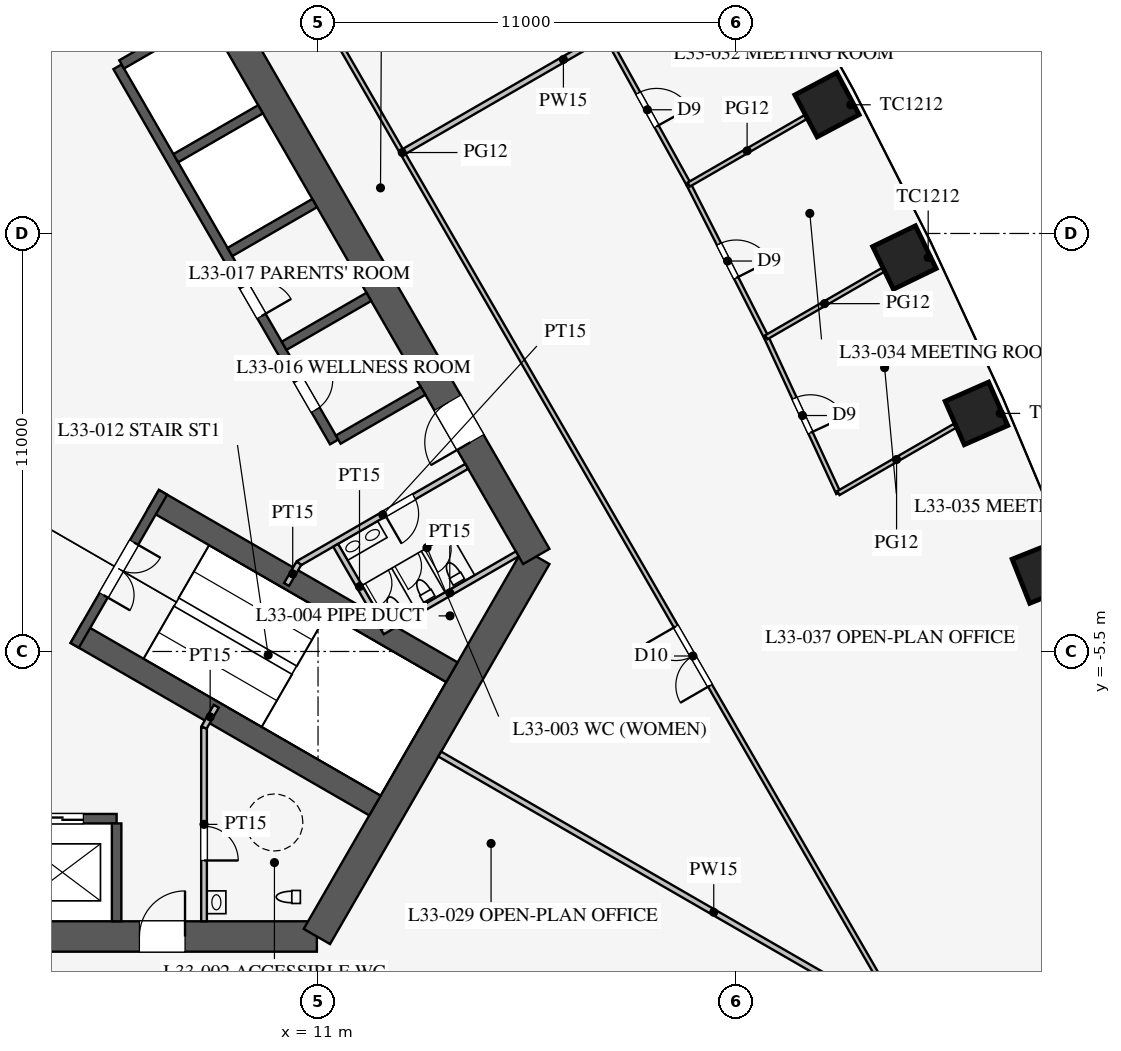
"""IFC4 building model, lengths in metres.
Left out: names, types, materials, properties, quantities, classifications, styles, units other than length and angle.
Written with IfcOpenShell. Run it as: python <this file> out.ifc"""

import sys

from ifc_helpers import new_model, si_unit, direction, frame, frame_2d, origin, origin_2d, place, context, subcontext, project, spatial, rectangle, extrude, element, fill, save


model = new_model("IFC4")
c1 = context("Model", 3, precision=1e-05, world=origin(), true_north=direction((0.0, 1.0)))
c2 = subcontext(c1, "Body", "Model", "MODEL_VIEW")
j1 = project(units=[si_unit("LENGTHUNIT", "METRE"), si_unit("PLANEANGLEUNIT", "RADIAN")], contexts=[c1])
p1 = place(None, origin())
s1 = spatial("IfcSite", under=j1, at=p1, CompositionType="ELEMENT")
p2 = place(p1, origin())
s2 = spatial("IfcBuilding", under=s1, at=p2, CompositionType="ELEMENT")
p3 = place(p2, frame((0.0, 0.0, 145.1)))
s3 = spatial("IfcBuildingStorey", under=s2, at=p3, CompositionType="ELEMENT", Elevation=145.1)
for number, where, z_axis, x_axis in (
    (1, (30.077, -3.42, 0.0), (0.0, 0.0, 1.0), (-0.37, 0.929, 0.0)),
    (2, (28.325, 0.765, 0.0), (0.0, 0.0, 1.0), (-0.403, 0.915, 0.0)),
    (3, (26.43, 4.867, 0.0), (0.0, 0.0, 1.0), (-0.436, 0.9, 0.0)),
    (4, (24.393, 8.887, 0.0), (0.0, 0.0, 1.0), (-0.468, 0.883, 0.0)),
):
    element("IfcColumn", number, at=place(p3, frame(where, z_axis=z_axis, x_axis=x_axis)), inside=s3, PredefinedType="COLUMN", context=c2, shape_type="SweptSolid", body=[
        extrude(rectangle(XDim=1.25, YDim=1.25, at=origin_2d()), origin(), (0.0, 0.0, 1.0), 4.2),
    ])
p4 = place(p3, frame((-10.97, -13.0, 0.0), z_axis=(0.0, 0.0, 1.0), x_axis=(1.0, 0.0, 0.0)))
e5 = element("IfcWall", 5, at=p4, inside=s3, PredefinedType="SHEAR", context=c2, shape_type="SweptSolid", body=[
    extrude(rectangle(XDim=21.939, YDim=0.8, at=frame_2d((10.97, 0.0))), origin(), (0.0, 0.0, 1.0), 4.2),
])
p5 = place(p4, frame((17.27, 0.0, 0.0)))
e6 = element("IfcOpeningElement", 6, at=p5, cuts=e5, PredefinedType="OPENING", context=c2, shape_type="SweptSolid", body=[
    extrude(rectangle(XDim=1.2, YDim=2.1, at=frame_2d((0.6, 1.05))), frame((0.0, 0.41, 0.0), z_axis=(0.0, -1.0, 0.0), x_axis=(1.0, 0.0, 0.0)), (0.0, 0.0, 1.0), 0.82),
])
p6 = place(p4, frame((3.47, 0.0, 0.0)))
e7 = element("IfcOpeningElement", 7, at=p6, cuts=e5, PredefinedType="OPENING", context=c2, shape_type="SweptSolid", body=[
    extrude(rectangle(XDim=1.2, YDim=2.1, at=frame_2d((0.6, 1.05))), frame((0.0, 0.41, 0.0), z_axis=(0.0, -1.0, 0.0), x_axis=(1.0, 0.0, 0.0)), (0.0, 0.0, 1.0), 0.82),
])
p7 = place(p3, frame((10.97, -13.0, 0.0), z_axis=(0.0, 0.0, 1.0), x_axis=(0.499995765644, 0.866027848477, 0.0)))
e8 = element("IfcWall", 8, at=p7, inside=s3, PredefinedType="SHEAR", context=c2, shape_type="SweptSolid", body=[
    extrude(rectangle(XDim=11.547, YDim=0.8, at=frame_2d((5.773, 0.0))), origin(), (0.0, 0.0, 1.0), 4.2),
])
p8 = place(p3, frame((16.743, -3.0, 0.0), z_axis=(0.0, 0.0, 1.0), x_axis=(-0.500002442456, 0.866023993627, 0.0)))
e9 = element("IfcWall", 9, at=p8, inside=s3, PredefinedType="SHEAR", context=c2, shape_type="SweptSolid", body=[
    extrude(rectangle(XDim=21.939, YDim=0.8, at=frame_2d((10.97, 0.0))), origin(), (0.0, 0.0, 1.0), 4.2),
])
p9 = place(p8, frame((17.27, 0.0, 0.0)))
e10 = element("IfcOpeningElement", 10, at=p9, cuts=e9, PredefinedType="OPENING", context=c2, shape_type="SweptSolid", body=[
    extrude(rectangle(XDim=1.2, YDim=2.1, at=frame_2d((0.6, 1.05))), frame((0.0, 0.41, 0.0), z_axis=(0.0, -1.0, 0.0), x_axis=(1.0, 0.0, 0.0)), (0.0, 0.0, 1.0), 0.82),
])
p10 = place(p8, frame((3.47, 0.0, 0.0)))
e11 = element("IfcOpeningElement", 11, at=p10, cuts=e9, PredefinedType="OPENING", context=c2, shape_type="SweptSolid", body=[
    extrude(rectangle(XDim=1.2, YDim=2.1, at=frame_2d((0.6, 1.05))), frame((0.0, 0.41, 0.0), z_axis=(0.0, -1.0, 0.0), x_axis=(1.0, 0.0, 0.0)), (0.0, 0.0, 1.0), 0.82),
])
p11 = place(p3, frame((-5.7, -9.9, 0.0), z_axis=(0.0, 0.0, 1.0), x_axis=(1.0, 0.0, 0.0)))
e12 = element("IfcWall", 12, at=p11, inside=s3, PredefinedType="SHEAR", context=c2, shape_type="SweptSolid", body=[
    extrude(rectangle(XDim=11.4, YDim=0.25, at=frame_2d((5.7, 0.0))), origin(), (0.0, 0.0, 1.0), 4.2),
])
p12 = place(p11, frame((0.875, 0.0, 0.0)))
e13 = element("IfcOpeningElement", 13, at=p12, cuts=e12, PredefinedType="OPENING", context=c2, shape_type="SweptSolid", body=[
    extrude(rectangle(XDim=1.1, YDim=2.2, at=frame_2d((0.55, 1.1))), frame((0.0, 0.135, 0.0), z_axis=(0.0, -1.0, 0.0), x_axis=(1.0, 0.0, 0.0)), (0.0, 0.0, 1.0), 0.27),
])
p13 = place(p11, frame((3.725, 0.0, 0.0)))
e14 = element("IfcOpeningElement", 14, at=p13, cuts=e12, PredefinedType="OPENING", context=c2, shape_type="SweptSolid", body=[
    extrude(rectangle(XDim=1.1, YDim=2.2, at=frame_2d((0.55, 1.1))), frame((0.0, 0.135, 0.0), z_axis=(0.0, -1.0, 0.0), x_axis=(1.0, 0.0, 0.0)), (0.0, 0.0, 1.0), 0.27),
])
p14 = place(p11, frame((6.575, 0.0, 0.0)))
e15 = element("IfcOpeningElement", 15, at=p14, cuts=e12, PredefinedType="OPENING", context=c2, shape_type="SweptSolid", body=[
    extrude(rectangle(XDim=1.1, YDim=2.2, at=frame_2d((0.55, 1.1))), frame((0.0, 0.135, 0.0), z_axis=(0.0, -1.0, 0.0), x_axis=(1.0, 0.0, 0.0)), (0.0, 0.0, 1.0), 0.27),
])
p15 = place(p11, frame((9.425, 0.0, 0.0)))
e16 = element("IfcOpeningElement", 16, at=p15, cuts=e12, PredefinedType="OPENING", context=c2, shape_type="SweptSolid", body=[
    extrude(rectangle(XDim=1.1, YDim=2.2, at=frame_2d((0.55, 1.1))), frame((0.0, 0.135, 0.0), z_axis=(0.0, -1.0, 0.0), x_axis=(1.0, 0.0, 0.0)), (0.0, 0.0, 1.0), 0.27),
])
p16 = place(p3, frame((5.7, -10.025, 0.0), z_axis=(0.0, 0.0, 1.0), x_axis=(0.0, -1.0, 0.0)))
e17 = element("IfcWall", 17, at=p16, inside=s3, PredefinedType="SHEAR", context=c2, shape_type="SweptSolid", body=[
    extrude(rectangle(XDim=2.575, YDim=0.25, at=frame_2d((1.288, 0.0))), origin(), (0.0, 0.0, 1.0), 4.2),
])
p17 = place(p3, frame((11.424, 0.014, 0.0), z_axis=(0.0, 0.0, 1.0), x_axis=(-0.500001763848, 0.866024385424, 0.0)))
e18 = element("IfcWall", 18, at=p17, inside=s3, PredefinedType="SHEAR", context=c2, shape_type="SweptSolid", body=[
    extrude(rectangle(XDim=11.4, YDim=0.25, at=frame_2d((5.7, 0.0))), origin(), (0.0, 0.0, 1.0), 4.2),
])
p18 = place(p17, frame((0.975, 0.0, 0.0)))
e19 = element("IfcOpeningElement", 19, at=p18, cuts=e18, PredefinedType="OPENING", context=c2, shape_type="SweptSolid", body=[
    extrude(rectangle(XDim=0.9, YDim=2.1, at=frame_2d((0.45, 1.05))), frame((0.0, 0.135, 0.0), z_axis=(0.0, -1.0, 0.0), x_axis=(1.0, 0.0, 0.0)), (0.0, 0.0, 1.0), 0.27),
])
p19 = place(p17, frame((3.825, 0.0, 0.0)))
e20 = element("IfcOpeningElement", 20, at=p19, cuts=e18, PredefinedType="OPENING", context=c2, shape_type="SweptSolid", body=[
    extrude(rectangle(XDim=0.9, YDim=2.1, at=frame_2d((0.45, 1.05))), frame((0.0, 0.135, 0.0), z_axis=(0.0, -1.0, 0.0), x_axis=(1.0, 0.0, 0.0)), (0.0, 0.0, 1.0), 0.27),
])
for number, where, z_axis, x_axis in (
    (21, (11.532, 0.076, 0.0), (0.0, 0.0, 1.0), (0.866, 0.5, 0.0)),
    (22, (10.107, 2.544, 0.0), (0.0, 0.0, 1.0), (0.866, 0.5, 0.0)),
    (23, (8.682, 5.012, 0.0), (0.0, 0.0, 1.0), (0.866, 0.5, 0.0)),
    (24, (7.257, 7.481, 0.0), (0.0, 0.0, 1.0), (0.866, 0.5, 0.0)),
):
    element("IfcWall", number, at=place(p3, frame(where, z_axis=z_axis, x_axis=x_axis)), inside=s3, PredefinedType="SHEAR", context=c2, shape_type="SweptSolid", body=[
        extrude(rectangle(XDim=2.575, YDim=0.25, at=frame_2d((1.288, 0.0))), origin(), (0.0, 0.0, 1.0), 4.2),
    ])
p20 = place(p3, frame((5.832, 9.949, 0.0), z_axis=(0.0, 0.0, 1.0), x_axis=(0.866029291668, 0.499993265928, 0.0)))
e25 = element("IfcWall", 25, at=p20, inside=s3, PredefinedType="SHEAR", context=c2, shape_type="SweptSolid", body=[
    extrude(rectangle(XDim=2.575, YDim=0.25, at=frame_2d((1.288, 0.0))), origin(), (0.0, 0.0, 1.0), 4.2),
])
for number, where, z_axis, x_axis in (
    (26, (4.638, -5.016, 0.0), (0.0, 0.0, 1.0), (0.866, -0.5, 0.0)),
    (27, (6.663, -1.509, 0.0), (0.0, 0.0, 1.0), (0.866, -0.5, 0.0)),
):
    element("IfcWall", number, at=place(p3, frame(where, z_axis=z_axis, x_axis=x_axis)), inside=s3, PredefinedType="SHEAR", context=c2, shape_type="SweptSolid", body=[
        extrude(rectangle(XDim=9.075, YDim=0.6, at=frame_2d((4.538, 0.0))), origin(), (0.0, 0.0, 1.0), 4.2),
    ])
p21 = place(p3, frame((4.597, -5.339, 0.0), z_axis=(0.0, 0.0, 1.0), x_axis=(0.499984536904, 0.866034331223, 0.0)))
e28 = element("IfcWall", 28, at=p21, inside=s3, PredefinedType="SHEAR", context=c2, shape_type="SweptSolid", body=[
    extrude(rectangle(XDim=4.65, YDim=0.25, at=frame_2d((2.325, 0.0))), origin(), (0.0, 0.0, 1.0), 4.2),
])
p22 = place(p21, frame((1.525, 0.0, 0.0)))
e29 = element("IfcOpeningElement", 29, at=p22, cuts=e28, PredefinedType="OPENING", context=c2, shape_type="SweptSolid", body=[
    extrude(rectangle(XDim=1.6, YDim=2.1, at=frame_2d((0.8, 1.05))), frame((0.0, 0.135, 0.0), z_axis=(0.0, -1.0, 0.0), x_axis=(1.0, 0.0, 0.0)), (0.0, 0.0, 1.0), 0.27),
])
p23 = place(p3, frame((8.0, -7.5, 0.0), z_axis=(0.0, 0.0, 1.0), x_axis=(0.0, -1.0, 0.0)))
e30 = element("IfcWall", 30, at=p23, inside=s3, PredefinedType="PARTITIONING", context=c2, shape_type="SweptSolid", body=[
    extrude(rectangle(XDim=5.1, YDim=0.15, at=frame_2d((2.55, 0.0))), origin(), (0.0, 0.0, 1.0), 4.0),
])
p24 = place(p23, frame((2.6, 0.0, 0.0)))
e31 = element("IfcOpeningElement", 31, at=p24, cuts=e30, PredefinedType="OPENING", context=c2, shape_type="SweptSolid", body=[
    extrude(rectangle(XDim=0.9, YDim=2.1, at=frame_2d((0.45, 1.05))), frame((0.0, 0.085, 0.0), z_axis=(0.0, -1.0, 0.0), x_axis=(1.0, 0.0, 0.0)), (0.0, 0.0, 1.0), 0.17),
])
p25 = place(p3, frame((10.495, -3.178, 0.0), z_axis=(0.0, 0.0, 1.0), x_axis=(0.86602216432, 0.500005610874, 0.0)))
e32 = element("IfcWall", 32, at=p25, inside=s3, PredefinedType="PARTITIONING", context=c2, shape_type="SweptSolid", body=[
    extrude(rectangle(XDim=5.1, YDim=0.15, at=frame_2d((2.55, 0.0))), origin(), (0.0, 0.0, 1.0), 4.0),
])
p26 = place(p25, frame((2.6, 0.0, 0.0)))
e33 = element("IfcOpeningElement", 33, at=p26, cuts=e32, PredefinedType="OPENING", context=c2, shape_type="SweptSolid", body=[
    extrude(rectangle(XDim=0.9, YDim=2.1, at=frame_2d((0.45, 1.05))), frame((0.0, 0.085, 0.0), z_axis=(0.0, -1.0, 0.0), x_axis=(1.0, 0.0, 0.0)), (0.0, 0.0, 1.0), 0.17),
])
for number, where, z_axis, x_axis in (
    (34, (8.0, -7.5, 0.0), (0.0, 0.0, 1.0), (0.5, 0.866, 0.0)),
    (35, (10.495, -3.178, 0.0), (0.0, 0.0, 1.0), (-0.5, -0.866, 0.0)),
):
    element("IfcWall", number, at=place(p3, frame(where, z_axis=z_axis, x_axis=x_axis)), inside=s3, PredefinedType="PARTITIONING", context=c2, shape_type="SweptSolid", body=[
        extrude(rectangle(XDim=0.645, YDim=0.15, at=frame_2d((0.323, 0.0))), origin(), (0.0, 0.0, 1.0), 4.0),
    ])
p27 = place(p3, frame((12.691, -4.982, 0.0), z_axis=(0.0, 0.0, 1.0), x_axis=(0.8660249478, 0.500000789788, 0.0)))
e36 = element("IfcWall", 36, at=p27, inside=s3, PredefinedType="PARTITIONING", context=c2, shape_type="SweptSolid", body=[
    extrude(rectangle(XDim=4.1, YDim=0.15, at=frame_2d((2.05, 0.0))), origin(), (0.0, 0.0, 1.0), 4.0),
])
p28 = place(p3, frame((11.464, -2.706, 0.0), z_axis=(0.0, 0.0, 1.0), x_axis=(0.50001992892, -0.866013897511, 0.0)))
e37 = element("IfcWall", 37, at=p28, inside=s3, PredefinedType="PARTITIONING", context=c2, shape_type="SweptSolid", body=[
    extrude(rectangle(XDim=2.51, YDim=0.15, at=frame_2d((1.255, 0.0))), origin(), (0.0, 0.0, 1.0), 4.0),
])
p29 = place(p3, frame((14.203, -8.2, 0.0), z_axis=(0.0, 0.0, 1.0), x_axis=(0.866024668836, -0.500001272966, 0.0)))
e38 = element("IfcWall", 38, at=p29, inside=s3, PredefinedType="PARTITIONING", context=c2, shape_type="SweptSolid", body=[
    extrude(rectangle(XDim=16.65, YDim=0.15, at=frame_2d((8.325, 0.0))), origin(), (0.0, 0.0, 1.0), 2.3),
])
p30 = place(p3, frame((13.268, 7.66, 0.0), z_axis=(0.0, 0.0, 1.0), x_axis=(0.866020011605, 0.500009339412, 0.0)))
e39 = element("IfcWall", 39, at=p30, inside=s3, PredefinedType="PARTITIONING", context=c2, shape_type="SweptSolid", body=[
    extrude(rectangle(XDim=9.675, YDim=0.15, at=frame_2d((4.837, 0.0))), origin(), (0.0, 0.0, 1.0), 3.2),
])
p31 = place(p3, frame((26.415, -15.231, 0.0), z_axis=(0.0, 0.0, 1.0), x_axis=(-0.50000091641, 0.866024874695, 0.0)))
e40 = element("IfcWall", 40, at=p31, inside=s3, PredefinedType="PARTITIONING", context=c2, shape_type="SweptSolid", body=[
    extrude(rectangle(XDim=52.796, YDim=0.12, at=frame_2d((26.398, 0.0))), origin(), (0.0, 0.0, 1.0), 2.9),
])
p32 = place(p31, frame((10.2, 0.0, 0.15)))
e41 = element("IfcOpeningElement", 41, at=p32, cuts=e40, PredefinedType="OPENING", context=c2, shape_type="SweptSolid", body=[
    extrude(rectangle(XDim=1.8, YDim=2.1, at=frame_2d((0.9, 1.05))), frame((0.0, 0.07, 0.0), z_axis=(0.0, -1.0, 0.0), x_axis=(1.0, 0.0, 0.0)), (0.0, 0.0, 1.0), 0.14),
])
p33 = place(p31, frame((40.8, 0.0, 0.15)))
e42 = element("IfcOpeningElement", 42, at=p33, cuts=e40, PredefinedType="OPENING", context=c2, shape_type="SweptSolid", body=[
    extrude(rectangle(XDim=1.8, YDim=2.1, at=frame_2d((0.9, 1.05))), frame((0.0, 0.07, 0.0), z_axis=(0.0, -1.0, 0.0), x_axis=(1.0, 0.0, 0.0)), (0.0, 0.0, 1.0), 0.14),
])
p34 = place(p3, frame((24.692, -1.333, 0.0), z_axis=(0.0, 0.0, 1.0), x_axis=(-0.41992827805, 0.90755729367, 0.0)))
e43 = element("IfcWall", 43, at=p34, inside=s3, PredefinedType="PARTITIONING", context=c2, shape_type="SweptSolid", body=[
    extrude(rectangle(XDim=4.519, YDim=0.12, at=frame_2d((2.259, 0.0))), origin(), (0.0, 0.0, 1.0), 2.9),
])
p35 = place(p34, frame((1.75, 0.0, 0.15)))
e44 = element("IfcOpeningElement", 44, at=p35, cuts=e43, PredefinedType="OPENING", context=c2, shape_type="SweptSolid", body=[
    extrude(rectangle(XDim=1.0, YDim=2.1, at=frame_2d((0.5, 1.05))), frame((0.0, 0.07, 0.0), z_axis=(0.0, -1.0, 0.0), x_axis=(1.0, 0.0, 0.0)), (0.0, 0.0, 1.0), 0.14),
])
p36 = place(p3, frame((20.756, 6.787, 0.0), z_axis=(0.0, 0.0, 1.0), x_axis=(-0.484292898211, 0.874905931368, 0.0)))
e45 = element("IfcWall", 45, at=p36, inside=s3, PredefinedType="PARTITIONING", context=c2, shape_type="SweptSolid", body=[
    extrude(rectangle(XDim=4.501, YDim=0.12, at=frame_2d((2.25, 0.0))), origin(), (0.0, 0.0, 1.0), 2.9),
])
p37 = place(p36, frame((1.75, 0.0, 0.15)))
e46 = element("IfcOpeningElement", 46, at=p37, cuts=e45, PredefinedType="OPENING", context=c2, shape_type="SweptSolid", body=[
    extrude(rectangle(XDim=1.0, YDim=2.1, at=frame_2d((0.5, 1.05))), frame((0.0, 0.07, 0.0), z_axis=(0.0, -1.0, 0.0), x_axis=(1.0, 0.0, 0.0)), (0.0, 0.0, 1.0), 0.14),
])
p38 = place(p3, frame((22.795, 2.768, 0.0), z_axis=(0.0, 0.0, 1.0), x_axis=(-0.452471679136, 0.891778772779, 0.0)))
e47 = element("IfcWall", 47, at=p38, inside=s3, PredefinedType="PARTITIONING", context=c2, shape_type="SweptSolid", body=[
    extrude(rectangle(XDim=4.507, YDim=0.12, at=frame_2d((2.253, 0.0))), origin(), (0.0, 0.0, 1.0), 2.9),
])
p39 = place(p38, frame((1.75, 0.0, 0.15)))
e48 = element("IfcOpeningElement", 48, at=p39, cuts=e47, PredefinedType="OPENING", context=c2, shape_type="SweptSolid", body=[
    extrude(rectangle(XDim=1.0, YDim=2.1, at=frame_2d((0.5, 1.05))), frame((0.0, 0.07, 0.0), z_axis=(0.0, -1.0, 0.0), x_axis=(1.0, 0.0, 0.0)), (0.0, 0.0, 1.0), 0.14),
])
p40 = place(p3, frame((24.692, -1.333, 0.0), z_axis=(0.0, 0.0, 1.0), x_axis=(0.866021192743, 0.500007293666, 0.0)))
e49 = element("IfcWall", 49, at=p40, inside=s3, PredefinedType="PARTITIONING", context=c2, shape_type="SweptSolid", body=[
    extrude(rectangle(XDim=3.537, YDim=0.12, at=frame_2d((1.768, 0.0))), origin(), (0.0, 0.0, 1.0), 2.9),
])
p41 = place(p3, frame((20.756, 6.787, 0.0), z_axis=(0.0, 0.0, 1.0), x_axis=(0.866038754309, 0.499976875499, 0.0)))
e50 = element("IfcWall", 50, at=p41, inside=s3, PredefinedType="PARTITIONING", context=c2, shape_type="SweptSolid", body=[
    extrude(rectangle(XDim=3.544, YDim=0.12, at=frame_2d((1.772, 0.0))), origin(), (0.0, 0.0, 1.0), 2.9),
])
p42 = place(p3, frame((22.795, 2.768, 0.0), z_axis=(0.0, 0.0, 1.0), x_axis=(0.866045526189, 0.499965145353, 0.0)))
e51 = element("IfcWall", 51, at=p42, inside=s3, PredefinedType="PARTITIONING", context=c2, shape_type="SweptSolid", body=[
    extrude(rectangle(XDim=3.541, YDim=0.12, at=frame_2d((1.771, 0.0))), origin(), (0.0, 0.0, 1.0), 2.9),
])
p43 = place(p24, origin())
e52 = element("IfcDoor", 52, at=p43, inside=s3, OperationType="SINGLE_SWING_RIGHT", PredefinedType="DOOR", context=c2, shape_type="SweptSolid", body=[
    extrude(rectangle(XDim=0.9, YDim=2.1, at=frame_2d((0.45, 1.05))), frame((0.0, 0.025, 0.0), z_axis=(0.0, -1.0, 0.0), x_axis=(1.0, 0.0, 0.0)), (0.0, 0.0, 1.0), 0.05),
])
fill(e31, e52)
p44 = place(p26, frame((0.9, 0.0, 0.0), z_axis=(0.0, 0.0, 1.0), x_axis=(-1.0, 0.0, 0.0)))
e53 = element("IfcDoor", 53, at=p44, inside=s3, OperationType="SINGLE_SWING_RIGHT", PredefinedType="DOOR", context=c2, shape_type="SweptSolid", body=[
    extrude(rectangle(XDim=0.9, YDim=2.1, at=frame_2d((0.45, 1.05))), frame((0.0, 0.025, 0.0), z_axis=(0.0, -1.0, 0.0), x_axis=(1.0, 0.0, 0.0)), (0.0, 0.0, 1.0), 0.05),
])
fill(e33, e53)
p45 = place(p22, frame((1.6, 0.0, 0.0), z_axis=(0.0, 0.0, 1.0), x_axis=(-1.0, 0.0, 0.0)))
e54 = element("IfcDoor", 54, at=p45, inside=s3, OperationType="DOUBLE_DOOR_SINGLE_SWING", PredefinedType="DOOR", context=c2, shape_type="SweptSolid", body=[
    extrude(rectangle(XDim=1.6, YDim=2.1, at=frame_2d((0.8, 1.05))), frame((0.0, 0.025, 0.0), z_axis=(0.0, -1.0, 0.0), x_axis=(1.0, 0.0, 0.0)), (0.0, 0.0, 1.0), 0.05),
])
fill(e29, e54)
p46 = place(p5, origin())
e55 = element("IfcDoor", 55, at=p46, inside=s3, OperationType="SINGLE_SWING_RIGHT", PredefinedType="DOOR", context=c2, shape_type="SweptSolid", body=[
    extrude(rectangle(XDim=1.2, YDim=2.1, at=frame_2d((0.6, 1.05))), frame((0.0, 0.025, 0.0), z_axis=(0.0, -1.0, 0.0), x_axis=(1.0, 0.0, 0.0)), (0.0, 0.0, 1.0), 0.05),
])
fill(e6, e55)
p47 = place(p10, origin())
e56 = element("IfcDoor", 56, at=p47, inside=s3, OperationType="SINGLE_SWING_LEFT", PredefinedType="DOOR", context=c2, shape_type="SweptSolid", body=[
    extrude(rectangle(XDim=1.2, YDim=2.1, at=frame_2d((0.6, 1.05))), frame((0.0, 0.025, 0.0), z_axis=(0.0, -1.0, 0.0), x_axis=(1.0, 0.0, 0.0)), (0.0, 0.0, 1.0), 0.05),
])
fill(e11, e56)
p48 = place(p18, frame((0.9, 0.0, 0.0), z_axis=(0.0, 0.0, 1.0), x_axis=(-1.0, 0.0, 0.0)))
e57 = element("IfcDoor", 57, at=p48, inside=s3, OperationType="SINGLE_SWING_LEFT", PredefinedType="DOOR", context=c2, shape_type="SweptSolid", body=[
    extrude(rectangle(XDim=0.9, YDim=2.1, at=frame_2d((0.45, 1.05))), frame((0.0, 0.025, 0.0), z_axis=(0.0, -1.0, 0.0), x_axis=(1.0, 0.0, 0.0)), (0.0, 0.0, 1.0), 0.05),
])
fill(e19, e57)
p49 = place(p19, frame((0.9, 0.0, 0.0), z_axis=(0.0, 0.0, 1.0), x_axis=(-1.0, 0.0, 0.0)))
e58 = element("IfcDoor", 58, at=p49, inside=s3, OperationType="SINGLE_SWING_RIGHT", PredefinedType="DOOR", context=c2, shape_type="SweptSolid", body=[
    extrude(rectangle(XDim=0.9, YDim=2.1, at=frame_2d((0.45, 1.05))), frame((0.0, 0.025, 0.0), z_axis=(0.0, -1.0, 0.0), x_axis=(1.0, 0.0, 0.0)), (0.0, 0.0, 1.0), 0.05),
])
fill(e20, e58)
p50 = place(p37, frame((1.0, 0.0, 0.0), z_axis=(0.0, 0.0, 1.0), x_axis=(-1.0, 0.0, 0.0)))
e59 = element("IfcDoor", 59, at=p50, inside=s3, OperationType="SINGLE_SWING_RIGHT", PredefinedType="DOOR", context=c2, shape_type="SweptSolid", body=[
    extrude(rectangle(XDim=1.0, YDim=2.1, at=frame_2d((0.5, 1.05))), frame((0.0, 0.025, 0.0), z_axis=(0.0, -1.0, 0.0), x_axis=(1.0, 0.0, 0.0)), (0.0, 0.0, 1.0), 0.05),
])
fill(e46, e59)
p51 = place(p39, frame((1.0, 0.0, 0.0), z_axis=(0.0, 0.0, 1.0), x_axis=(-1.0, 0.0, 0.0)))
e60 = element("IfcDoor", 60, at=p51, inside=s3, OperationType="SINGLE_SWING_RIGHT", PredefinedType="DOOR", context=c2, shape_type="SweptSolid", body=[
    extrude(rectangle(XDim=1.0, YDim=2.1, at=frame_2d((0.5, 1.05))), frame((0.0, 0.025, 0.0), z_axis=(0.0, -1.0, 0.0), x_axis=(1.0, 0.0, 0.0)), (0.0, 0.0, 1.0), 0.05),
])
fill(e48, e60)
p52 = place(p35, frame((1.0, 0.0, 0.0), z_axis=(0.0, 0.0, 1.0), x_axis=(-1.0, 0.0, 0.0)))
e61 = element("IfcDoor", 61, at=p52, inside=s3, OperationType="SINGLE_SWING_RIGHT", PredefinedType="DOOR", context=c2, shape_type="SweptSolid", body=[
    extrude(rectangle(XDim=1.0, YDim=2.1, at=frame_2d((0.5, 1.05))), frame((0.0, 0.025, 0.0), z_axis=(0.0, -1.0, 0.0), x_axis=(1.0, 0.0, 0.0)), (0.0, 0.0, 1.0), 0.05),
])
fill(e44, e61)
p53 = place(p32, origin())
e62 = element("IfcDoor", 62, at=p53, inside=s3, OperationType="DOUBLE_DOOR_SINGLE_SWING", PredefinedType="DOOR", context=c2, shape_type="SweptSolid", body=[
    extrude(rectangle(XDim=1.8, YDim=2.1, at=frame_2d((0.9, 1.05))), frame((0.0, 0.025, 0.0), z_axis=(0.0, -1.0, 0.0), x_axis=(1.0, 0.0, 0.0)), (0.0, 0.0, 1.0), 0.05),
])
fill(e41, e62)
p54 = place(p15, origin())
e63 = element("IfcDoor", 63, at=p54, inside=s3, OperationType="DOUBLE_DOOR_SLIDING", PredefinedType="DOOR", context=c2, shape_type="SweptSolid", body=[
    extrude(rectangle(XDim=1.1, YDim=2.2, at=frame_2d((0.55, 1.1))), frame((0.0, 0.025, 0.0), z_axis=(0.0, -1.0, 0.0), x_axis=(1.0, 0.0, 0.0)), (0.0, 0.0, 1.0), 0.05),
])
fill(e16, e63)
save(model, sys.argv[1])
